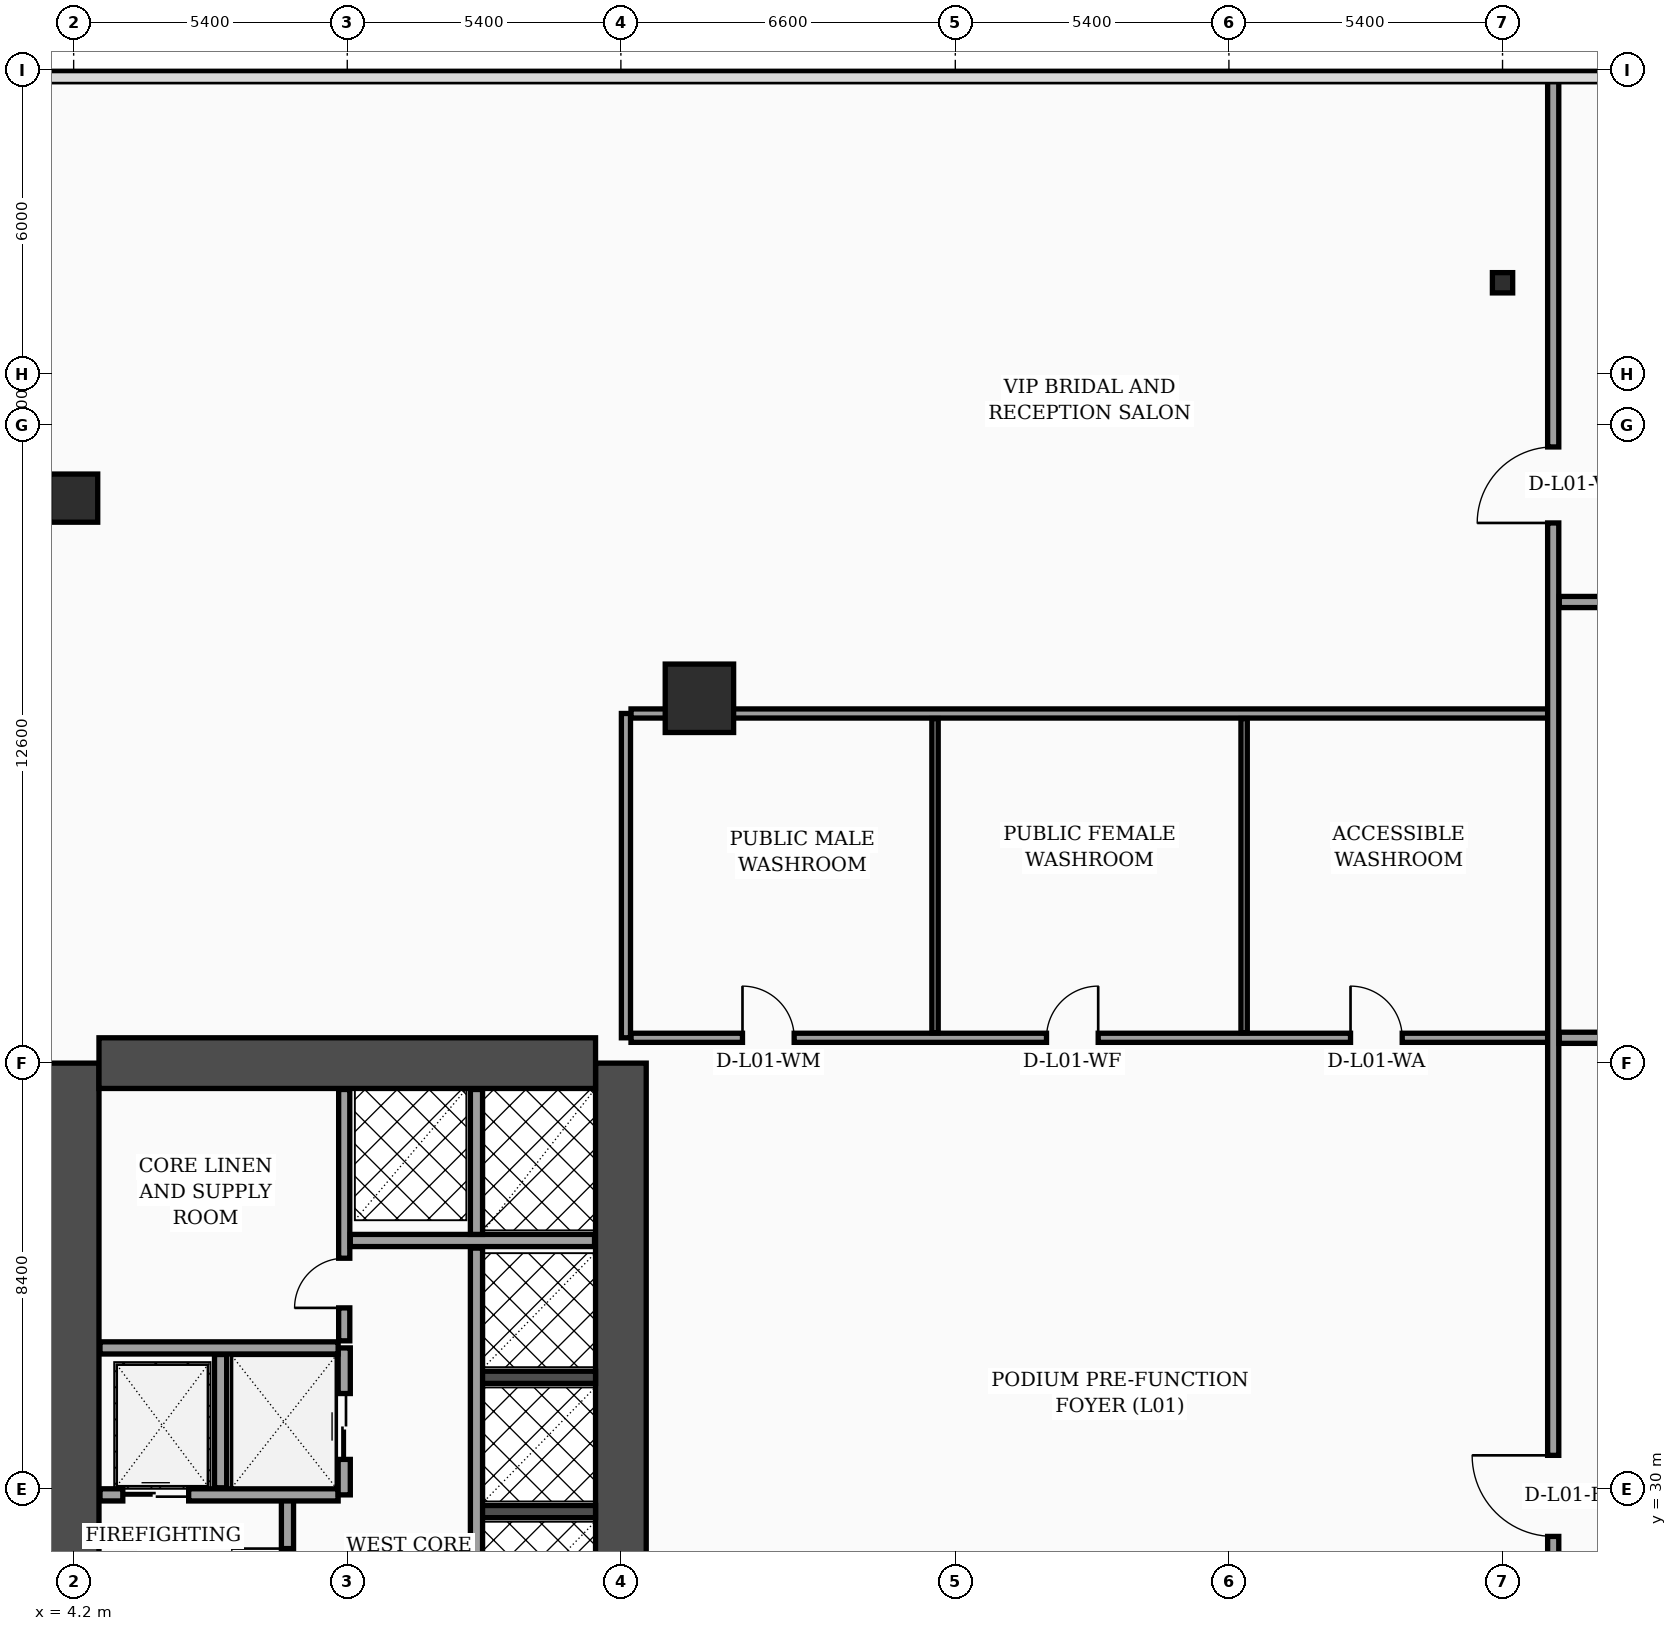
"""IFC4 building model, lengths in metres.
Left out: names, types, materials, properties, quantities, classifications, styles, units other than length and angle.
Written with IfcOpenShell. Run it as: python <this file> out.ifc"""

import sys

from ifc_helpers import new_model, si_unit, direction, frame, frame_2d, origin, origin_2d, place, context, subcontext, project, spatial, rectangle, hollow_rectangle, i_section, extrude, element, fill, save


model = new_model("IFC4")
c1 = context("Model", 3, precision=1e-05, world=origin(), true_north=direction((0.0, 1.0)))
c2 = subcontext(c1, "Body", "Model", "MODEL_VIEW")
j1 = project(units=[si_unit("LENGTHUNIT", "METRE"), si_unit("PLANEANGLEUNIT", "RADIAN")], contexts=[c1])
p1 = place(None, origin())
s1 = spatial("IfcSite", under=j1, at=p1, CompositionType="ELEMENT")
p2 = place(p1, origin())
s2 = spatial("IfcBuilding", under=s1, at=p2, CompositionType="ELEMENT")
p3 = place(p2, frame((0.0, 0.0, 6.0)))
s3 = spatial("IfcBuildingStorey", under=s2, at=p3, CompositionType="ELEMENT", Elevation=6.0)
p4 = place(p3, frame((4.2, 16.8, 0.0), z_axis=(0.0, 0.0, 1.0), x_axis=(0.0, 1.0, 0.0)))
e1 = element("IfcWall", 1, at=p4, inside=s3, PredefinedType="SHEAR", context=c2, shape_type="SweptSolid", body=[
    extrude(rectangle(XDim=21.6, YDim=1.0, at=frame_2d((10.8, 0.0))), origin(), (0.0, 0.0, 1.0), 5.68),
])
p5 = place(p3, frame((15.0, 16.8, 0.0), z_axis=(0.0, 0.0, 1.0), x_axis=(0.0, 1.0, 0.0)))
e2 = element("IfcWall", 2, at=p5, inside=s3, PredefinedType="SHEAR", context=c2, shape_type="SweptSolid", body=[
    extrude(rectangle(XDim=21.6, YDim=1.0, at=frame_2d((10.8, 0.0))), origin(), (0.0, 0.0, 1.0), 5.68),
])
p6 = place(p5, frame((8.65, 0.0, 0.0)))
e3 = element("IfcOpeningElement", 3, at=p6, cuts=e2, PredefinedType="OPENING", context=c2, shape_type="SweptSolid", body=[
    extrude(rectangle(XDim=1.1, YDim=2.2, at=frame_2d((0.55, 1.1))), frame((0.0, 0.51, 0.0), z_axis=(0.0, -1.0, 0.0), x_axis=(1.0, 0.0, 0.0)), (0.0, 0.0, 1.0), 1.02),
])
p7 = place(p5, frame((1.25, 0.0, 0.0)))
e4 = element("IfcOpeningElement", 4, at=p7, cuts=e2, PredefinedType="OPENING", context=c2, shape_type="SweptSolid", body=[
    extrude(rectangle(XDim=1.1, YDim=2.2, at=frame_2d((0.55, 1.1))), frame((0.0, 0.51, 0.0), z_axis=(0.0, -1.0, 0.0), x_axis=(1.0, 0.0, 0.0)), (0.0, 0.0, 1.0), 1.02),
])
p8 = place(p5, frame((3.8, 0.0, 0.0)))
e5 = element("IfcOpeningElement", 5, at=p8, cuts=e2, PredefinedType="OPENING", context=c2, shape_type="SweptSolid", body=[
    extrude(rectangle(XDim=1.1, YDim=2.2, at=frame_2d((0.55, 1.1))), frame((0.0, 0.51, 0.0), z_axis=(0.0, -1.0, 0.0), x_axis=(1.0, 0.0, 0.0)), (0.0, 0.0, 1.0), 1.02),
])
p9 = place(p5, frame((6.35, 0.0, 0.0)))
e6 = element("IfcOpeningElement", 6, at=p9, cuts=e2, PredefinedType="OPENING", context=c2, shape_type="SweptSolid", body=[
    extrude(rectangle(XDim=1.1, YDim=2.2, at=frame_2d((0.55, 1.1))), frame((0.0, 0.51, 0.0), z_axis=(0.0, -1.0, 0.0), x_axis=(1.0, 0.0, 0.0)), (0.0, 0.0, 1.0), 1.02),
])
p10 = place(p3, frame((4.7, 38.4, 0.0), z_axis=(0.0, 0.0, 1.0), x_axis=(1.0, 0.0, 0.0)))
e7 = element("IfcWall", 7, at=p10, inside=s3, PredefinedType="SHEAR", context=c2, shape_type="SweptSolid", body=[
    extrude(rectangle(XDim=9.8, YDim=1.0, at=frame_2d((4.9, 0.0))), origin(), (0.0, 0.0, 1.0), 5.68),
])
for number, where, z_axis, x_axis in (
    (8, (12.18, 29.55, 0.0), (0.0, 0.0, 1.0), (1.0, 0.0, 0.0)),
    (9, (12.18, 32.2, 0.0), (0.0, 0.0, 1.0), (1.0, 0.0, 0.0)),
):
    element("IfcWall", number, at=place(p3, frame(where, z_axis=z_axis, x_axis=x_axis)), inside=s3, PredefinedType="SOLIDWALL", context=c2, shape_type="SweptSolid", body=[
        extrude(rectangle(XDim=2.32, YDim=0.24, at=frame_2d((1.16, 0.0))), origin(), (0.0, 0.0, 1.0), 5.68),
    ])
p11 = place(p3, frame((4.2, 49.55, 0.0), z_axis=(0.0, 0.0, 1.0), x_axis=(1.0, 0.0, 0.0)))
e10 = element("IfcColumn", 10, at=p11, inside=s3, PredefinedType="COLUMN", context=c2, shape_type="SweptSolid", body=[
    extrude(hollow_rectangle(XDim=0.95, YDim=0.95, WallThickness=0.04, at=origin_2d()), origin(), (0.0, 0.0, 1.0), 5.68),
])
p12 = place(p3, frame((16.55, 45.6, 0.0), z_axis=(0.0, 0.0, 1.0), x_axis=(1.0, 0.0, 0.0)))
e11 = element("IfcColumn", 11, at=p12, inside=s3, PredefinedType="COLUMN", context=c2, shape_type="SweptSolid", body=[
    extrude(rectangle(XDim=1.35, YDim=1.35, at=origin_2d()), origin(), (0.0, 0.0, 1.0), 5.68),
])
p13 = place(p3, frame((32.4, 53.8, 0.0), z_axis=(0.0, 0.0, 1.0), x_axis=(1.0, 0.0, 0.0)))
e12 = element("IfcColumn", 12, at=p13, inside=s3, PredefinedType="PILASTER", context=c2, shape_type="SweptSolid", body=[
    extrude(i_section(OverallWidth=0.4, OverallDepth=0.4, WebThickness=0.013, FlangeThickness=0.021, FilletRadius=0.022, at=origin_2d()), origin(), (0.0, 0.0, 1.0), 5.68),
])
p14 = place(p3, frame((8.42, 26.82, 0.0), z_axis=(0.0, 0.0, 1.0), x_axis=(0.0, 1.0, 0.0)))
e13 = element("IfcWall", 13, at=p14, inside=s3, PredefinedType="SOLIDWALL", context=c2, shape_type="SweptSolid", body=[
    extrude(rectangle(XDim=3.0, YDim=0.24, at=frame_2d((1.5, 0.0))), origin(), (0.0, 0.0, 1.0), 5.68),
])
p15 = place(p14, frame((0.9, 0.0, 0.0)))
e14 = element("IfcOpeningElement", 14, at=p15, cuts=e13, PredefinedType="OPENING", context=c2, shape_type="SweptSolid", body=[
    extrude(rectangle(XDim=1.1, YDim=2.2, at=frame_2d((0.55, 1.1))), frame((0.0, 0.13, 0.0), z_axis=(0.0, -1.0, 0.0), x_axis=(1.0, 0.0, 0.0)), (0.0, 0.0, 1.0), 0.26),
])
p16 = place(p3, frame((4.72, 29.88, 0.0), z_axis=(0.0, 0.0, 1.0), x_axis=(1.0, 0.0, 0.0)))
e15 = element("IfcWall", 15, at=p16, inside=s3, PredefinedType="SOLIDWALL", context=c2, shape_type="SweptSolid", body=[
    extrude(rectangle(XDim=4.7, YDim=0.24, at=frame_2d((2.35, 0.0))), origin(), (0.0, 0.0, 1.0), 5.68),
])
p17 = place(p16, frame((0.45, 0.0, 0.0)))
e16 = element("IfcOpeningElement", 16, at=p17, cuts=e15, PredefinedType="OPENING", context=c2, shape_type="SweptSolid", body=[
    extrude(rectangle(XDim=1.3, YDim=2.35, at=frame_2d((0.65, 1.175))), frame((0.0, 0.13, 0.0), z_axis=(0.0, -1.0, 0.0), x_axis=(1.0, 0.0, 0.0)), (0.0, 0.0, 1.0), 0.26),
])
p18 = place(p3, frame((7.1, 30.02, 0.0), z_axis=(0.0, 0.0, 1.0), x_axis=(0.0, 1.0, 0.0)))
e17 = element("IfcWall", 17, at=p18, inside=s3, PredefinedType="SOLIDWALL", context=c2, shape_type="SweptSolid", body=[
    extrude(rectangle(XDim=2.63, YDim=0.24, at=frame_2d((1.315, 0.0))), origin(), (0.0, 0.0, 1.0), 5.68),
])
p19 = place(p3, frame((9.54, 29.88, 0.0), z_axis=(0.0, 0.0, 1.0), x_axis=(0.0, 1.0, 0.0)))
e18 = element("IfcWall", 18, at=p19, inside=s3, PredefinedType="SOLIDWALL", context=c2, shape_type="SweptSolid", body=[
    extrude(rectangle(XDim=2.9, YDim=0.24, at=frame_2d((1.45, 0.0))), origin(), (0.0, 0.0, 1.0), 5.68),
])
p20 = place(p19, frame((0.7, 0.0, 0.0)))
e19 = element("IfcOpeningElement", 19, at=p20, cuts=e18, PredefinedType="OPENING", context=c2, shape_type="SweptSolid", body=[
    extrude(rectangle(XDim=1.3, YDim=2.35, at=frame_2d((0.65, 1.175))), frame((0.0, 0.13, 0.0), z_axis=(0.0, -1.0, 0.0), x_axis=(1.0, 0.0, 0.0)), (0.0, 0.0, 1.0), 0.26),
])
p21 = place(p3, frame((4.72, 32.78, 0.0), z_axis=(0.0, 0.0, 1.0), x_axis=(1.0, 0.0, 0.0)))
e20 = element("IfcWall", 20, at=p21, inside=s3, PredefinedType="SOLIDWALL", context=c2, shape_type="SweptSolid", body=[
    extrude(rectangle(XDim=4.7, YDim=0.24, at=frame_2d((2.35, 0.0))), origin(), (0.0, 0.0, 1.0), 5.68),
])
p22 = place(p3, frame((9.54, 32.92, 0.0), z_axis=(0.0, 0.0, 1.0), x_axis=(0.0, 1.0, 0.0)))
e21 = element("IfcWall", 21, at=p22, inside=s3, PredefinedType="SOLIDWALL", context=c2, shape_type="SweptSolid", body=[
    extrude(rectangle(XDim=4.96, YDim=0.22, at=frame_2d((2.48, 0.0))), origin(), (0.0, 0.0, 1.0), 5.68),
])
p23 = place(p22, frame((0.65, 0.0, 0.0)))
e22 = element("IfcOpeningElement", 22, at=p23, cuts=e21, PredefinedType="OPENING", context=c2, shape_type="SweptSolid", body=[
    extrude(rectangle(XDim=0.98, YDim=2.15, at=frame_2d((0.49, 1.075))), frame((0.0, 0.12, 0.0), z_axis=(0.0, -1.0, 0.0), x_axis=(1.0, 0.0, 0.0)), (0.0, 0.0, 1.0), 0.24),
])
p24 = place(p3, frame((12.15, 27.0, 0.0), z_axis=(0.0, 0.0, 1.0), x_axis=(0.0, 1.0, 0.0)))
e23 = element("IfcWall", 23, at=p24, inside=s3, PredefinedType="SOLIDWALL", context=c2, shape_type="SweptSolid", body=[
    extrude(rectangle(XDim=7.75, YDim=0.24, at=frame_2d((3.875, 0.0))), origin(), (0.0, 0.0, 1.0), 5.68),
])
p25 = place(p3, frame((9.66, 34.9, 0.0), z_axis=(0.0, 0.0, 1.0), x_axis=(1.0, 0.0, 0.0)))
e24 = element("IfcWall", 24, at=p25, inside=s3, PredefinedType="SOLIDWALL", context=c2, shape_type="SweptSolid", body=[
    extrude(rectangle(XDim=4.82, YDim=0.24, at=frame_2d((2.41, 0.0))), origin(), (0.0, 0.0, 1.0), 5.68),
])
p26 = place(p3, frame((12.15, 35.02, 0.0), z_axis=(0.0, 0.0, 1.0), x_axis=(0.0, 1.0, 0.0)))
e25 = element("IfcWall", 25, at=p26, inside=s3, PredefinedType="SOLIDWALL", context=c2, shape_type="SweptSolid", body=[
    extrude(rectangle(XDim=2.86, YDim=0.24, at=frame_2d((1.43, 0.0))), origin(), (0.0, 0.0, 1.0), 5.68),
])
p27 = place(p3, frame((15.2, 38.9, 0.0), z_axis=(0.0, 0.0, 1.0), x_axis=(1.0, 0.0, 0.0)))
e26 = element("IfcWall", 26, at=p27, inside=s3, PredefinedType="PARTITIONING", context=c2, shape_type="SweptSolid", body=[
    extrude(rectangle(XDim=18.1, YDim=0.18, at=frame_2d((9.05, 0.0))), origin(), (0.0, 0.0, 1.0), 4.88),
])
p28 = place(p27, frame((2.2, 0.0, 0.0)))
e27 = element("IfcOpeningElement", 27, at=p28, cuts=e26, PredefinedType="OPENING", context=c2, shape_type="SweptSolid", body=[
    extrude(rectangle(XDim=1.02, YDim=2.2, at=frame_2d((0.51, 1.1))), frame((0.0, 0.1, 0.0), z_axis=(0.0, -1.0, 0.0), x_axis=(1.0, 0.0, 0.0)), (0.0, 0.0, 1.0), 0.2),
])
p29 = place(p27, frame((8.2, 0.0, 0.0)))
e28 = element("IfcOpeningElement", 28, at=p29, cuts=e26, PredefinedType="OPENING", context=c2, shape_type="SweptSolid", body=[
    extrude(rectangle(XDim=1.02, YDim=2.2, at=frame_2d((0.51, 1.1))), frame((0.0, 0.1, 0.0), z_axis=(0.0, -1.0, 0.0), x_axis=(1.0, 0.0, 0.0)), (0.0, 0.0, 1.0), 0.2),
])
p30 = place(p27, frame((14.2, 0.0, 0.0)))
e29 = element("IfcOpeningElement", 29, at=p30, cuts=e26, PredefinedType="OPENING", context=c2, shape_type="SweptSolid", body=[
    extrude(rectangle(XDim=1.02, YDim=2.2, at=frame_2d((0.51, 1.1))), frame((0.0, 0.1, 0.0), z_axis=(0.0, -1.0, 0.0), x_axis=(1.0, 0.0, 0.0)), (0.0, 0.0, 1.0), 0.2),
])
p31 = place(p3, frame((15.2, 45.3, 0.0), z_axis=(0.0, 0.0, 1.0), x_axis=(1.0, 0.0, 0.0)))
e30 = element("IfcWall", 30, at=p31, inside=s3, PredefinedType="PARTITIONING", context=c2, shape_type="SweptSolid", body=[
    extrude(rectangle(XDim=18.1, YDim=0.18, at=frame_2d((9.05, 0.0))), origin(), (0.0, 0.0, 1.0), 4.88),
])
p32 = place(p3, frame((15.1, 38.9, 0.0), z_axis=(0.0, 0.0, 1.0), x_axis=(0.0, 1.0, 0.0)))
e31 = element("IfcWall", 31, at=p32, inside=s3, PredefinedType="PARTITIONING", context=c2, shape_type="SweptSolid", body=[
    extrude(rectangle(XDim=6.4, YDim=0.18, at=frame_2d((3.2, 0.0))), origin(), (0.0, 0.0, 1.0), 4.88),
])
p33 = place(p3, frame((21.2, 39.0, 0.0), z_axis=(0.0, 0.0, 1.0), x_axis=(0.0, 1.0, 0.0)))
e32 = element("IfcWall", 32, at=p33, inside=s3, PredefinedType="PARTITIONING", context=c2, shape_type="SweptSolid", body=[
    extrude(rectangle(XDim=6.2, YDim=0.125, at=frame_2d((3.1, 0.0))), origin(), (0.0, 0.0, 1.0), 4.88),
])
p34 = place(p3, frame((27.3, 39.0, 0.0), z_axis=(0.0, 0.0, 1.0), x_axis=(0.0, 1.0, 0.0)))
e33 = element("IfcWall", 33, at=p34, inside=s3, PredefinedType="PARTITIONING", context=c2, shape_type="SweptSolid", body=[
    extrude(rectangle(XDim=6.2, YDim=0.125, at=frame_2d((3.1, 0.0))), origin(), (0.0, 0.0, 1.0), 5.68),
])
p35 = place(p3, frame((33.4, 0.06, 0.0), z_axis=(0.0, 0.0, 1.0), x_axis=(0.0, 1.0, 0.0)))
e34 = element("IfcWall", 34, at=p35, inside=s3, PredefinedType="SOLIDWALL", context=c2, shape_type="SweptSolid", body=[
    extrude(rectangle(XDim=57.88, YDim=0.22, at=frame_2d((28.94, 0.0))), origin(), (0.0, 0.0, 1.0), 4.88),
])
p36 = place(p35, frame((18.0, 0.0, 0.0)))
e35 = element("IfcOpeningElement", 35, at=p36, cuts=e34, PredefinedType="OPENING", context=c2, shape_type="SweptSolid", body=[
    extrude(rectangle(XDim=1.8, YDim=2.4, at=frame_2d((0.9, 1.2))), frame((0.0, 0.12, 0.0), z_axis=(0.0, -1.0, 0.0), x_axis=(1.0, 0.0, 0.0)), (0.0, 0.0, 1.0), 0.24),
])
p37 = place(p35, frame((29.0, 0.0, 0.0)))
e36 = element("IfcOpeningElement", 36, at=p37, cuts=e34, PredefinedType="OPENING", context=c2, shape_type="SweptSolid", body=[
    extrude(rectangle(XDim=1.6, YDim=2.35, at=frame_2d((0.8, 1.175))), frame((0.0, 0.12, 0.0), z_axis=(0.0, -1.0, 0.0), x_axis=(1.0, 0.0, 0.0)), (0.0, 0.0, 1.0), 0.24),
])
p38 = place(p35, frame((49.0, 0.0, 0.0)))
e37 = element("IfcOpeningElement", 37, at=p38, cuts=e34, PredefinedType="OPENING", context=c2, shape_type="SweptSolid", body=[
    extrude(rectangle(XDim=1.5, YDim=2.22, at=frame_2d((0.75, 1.11))), frame((0.0, 0.12, 0.0), z_axis=(0.0, -1.0, 0.0), x_axis=(1.0, 0.0, 0.0)), (0.0, 0.0, 1.0), 0.24),
])
p39 = place(p3, frame((33.52, 38.9, 0.0), z_axis=(0.0, 0.0, 1.0), x_axis=(1.0, 0.0, 0.0)))
e38 = element("IfcWall", 38, at=p39, inside=s3, PredefinedType="SOLIDWALL", context=c2, shape_type="SweptSolid", body=[
    extrude(rectangle(XDim=50.42, YDim=0.22, at=frame_2d((25.21, 0.0))), origin(), (0.0, 0.0, 1.0), 4.88),
])
p40 = place(p39, frame((15.0, 0.0, 0.0)))
e39 = element("IfcOpeningElement", 39, at=p40, cuts=e38, PredefinedType="OPENING", context=c2, shape_type="SweptSolid", body=[
    extrude(rectangle(XDim=1.6, YDim=2.35, at=frame_2d((0.8, 1.175))), frame((0.0, 0.12, 0.0), z_axis=(0.0, -1.0, 0.0), x_axis=(1.0, 0.0, 0.0)), (0.0, 0.0, 1.0), 0.24),
])
p41 = place(p3, frame((33.52, 47.5, 0.0), z_axis=(0.0, 0.0, 1.0), x_axis=(1.0, 0.0, 0.0)))
e40 = element("IfcWall", 40, at=p41, inside=s3, PredefinedType="SOLIDWALL", context=c2, shape_type="SweptSolid", body=[
    extrude(rectangle(XDim=19.58, YDim=0.22, at=frame_2d((9.79, 0.0))), origin(), (0.0, 0.0, 1.0), 4.88),
])
p42 = place(p41, frame((8.0, 0.0, 0.0)))
e41 = element("IfcOpeningElement", 41, at=p42, cuts=e40, PredefinedType="OPENING", context=c2, shape_type="SweptSolid", body=[
    extrude(rectangle(XDim=1.6, YDim=2.35, at=frame_2d((0.8, 1.175))), frame((0.0, 0.12, 0.0), z_axis=(0.0, -1.0, 0.0), x_axis=(1.0, 0.0, 0.0)), (0.0, 0.0, 1.0), 0.24),
])
p43 = place(p15, origin())
e42 = element("IfcDoor", 42, at=p43, inside=s3, OperationType="SINGLE_SWING_RIGHT", PredefinedType="DOOR", context=c2, shape_type="SweptSolid", body=[
    extrude(rectangle(XDim=1.1, YDim=2.2, at=frame_2d((0.55, 1.1))), frame((0.0, 0.025, 0.0), z_axis=(0.0, -1.0, 0.0), x_axis=(1.0, 0.0, 0.0)), (0.0, 0.0, 1.0), 0.05),
])
fill(e14, e42)
p44 = place(p17, origin())
e43 = element("IfcDoor", 43, at=p44, inside=s3, OperationType="DOUBLE_DOOR_SLIDING", PredefinedType="DOOR", context=c2, shape_type="SweptSolid", body=[
    extrude(rectangle(XDim=1.3, YDim=2.35, at=frame_2d((0.65, 1.175))), frame((0.0, 0.025, 0.0), z_axis=(0.0, -1.0, 0.0), x_axis=(1.0, 0.0, 0.0)), (0.0, 0.0, 1.0), 0.05),
])
fill(e16, e43)
p45 = place(p20, origin())
e44 = element("IfcDoor", 44, at=p45, inside=s3, OperationType="DOUBLE_DOOR_SLIDING", PredefinedType="DOOR", context=c2, shape_type="SweptSolid", body=[
    extrude(rectangle(XDim=1.3, YDim=2.35, at=frame_2d((0.65, 1.175))), frame((0.0, 0.025, 0.0), z_axis=(0.0, -1.0, 0.0), x_axis=(1.0, 0.0, 0.0)), (0.0, 0.0, 1.0), 0.05),
])
fill(e19, e44)
p46 = place(p23, origin())
e45 = element("IfcDoor", 45, at=p46, inside=s3, OperationType="SINGLE_SWING_LEFT", PredefinedType="DOOR", context=c2, shape_type="SweptSolid", body=[
    extrude(rectangle(XDim=0.98, YDim=2.15, at=frame_2d((0.49, 1.075))), frame((0.0, 0.025, 0.0), z_axis=(0.0, -1.0, 0.0), x_axis=(1.0, 0.0, 0.0)), (0.0, 0.0, 1.0), 0.05),
])
fill(e22, e45)
p47 = place(p28, origin())
e46 = element("IfcDoor", 46, at=p47, inside=s3, OperationType="SINGLE_SWING_LEFT", PredefinedType="DOOR", context=c2, shape_type="SweptSolid", body=[
    extrude(rectangle(XDim=1.02, YDim=2.2, at=frame_2d((0.51, 1.1))), frame((0.0, 0.025, 0.0), z_axis=(0.0, -1.0, 0.0), x_axis=(1.0, 0.0, 0.0)), (0.0, 0.0, 1.0), 0.05),
])
fill(e27, e46)
p48 = place(p29, origin())
e47 = element("IfcDoor", 47, at=p48, inside=s3, OperationType="SINGLE_SWING_RIGHT", PredefinedType="DOOR", context=c2, shape_type="SweptSolid", body=[
    extrude(rectangle(XDim=1.02, YDim=2.2, at=frame_2d((0.51, 1.1))), frame((0.0, 0.025, 0.0), z_axis=(0.0, -1.0, 0.0), x_axis=(1.0, 0.0, 0.0)), (0.0, 0.0, 1.0), 0.05),
])
fill(e28, e47)
p49 = place(p30, origin())
e48 = element("IfcDoor", 48, at=p49, inside=s3, OperationType="SINGLE_SWING_LEFT", PredefinedType="DOOR", context=c2, shape_type="SweptSolid", body=[
    extrude(rectangle(XDim=1.02, YDim=2.2, at=frame_2d((0.51, 1.1))), frame((0.0, 0.025, 0.0), z_axis=(0.0, -1.0, 0.0), x_axis=(1.0, 0.0, 0.0)), (0.0, 0.0, 1.0), 0.05),
])
fill(e29, e48)
p50 = place(p37, origin())
e49 = element("IfcDoor", 49, at=p50, inside=s3, OperationType="SINGLE_SWING_RIGHT", PredefinedType="DOOR", context=c2, shape_type="SweptSolid", body=[
    extrude(rectangle(XDim=1.6, YDim=2.35, at=frame_2d((0.8, 1.175))), frame((0.0, 0.025, 0.0), z_axis=(0.0, -1.0, 0.0), x_axis=(1.0, 0.0, 0.0)), (0.0, 0.0, 1.0), 0.05),
])
fill(e36, e49)
p51 = place(p38, origin())
e50 = element("IfcDoor", 50, at=p51, inside=s3, OperationType="SINGLE_SWING_LEFT", PredefinedType="DOOR", context=c2, shape_type="SweptSolid", body=[
    extrude(rectangle(XDim=1.5, YDim=2.22, at=frame_2d((0.75, 1.11))), frame((0.0, 0.025, 0.0), z_axis=(0.0, -1.0, 0.0), x_axis=(1.0, 0.0, 0.0)), (0.0, 0.0, 1.0), 0.05),
])
fill(e37, e50)
save(model, sys.argv[1])
